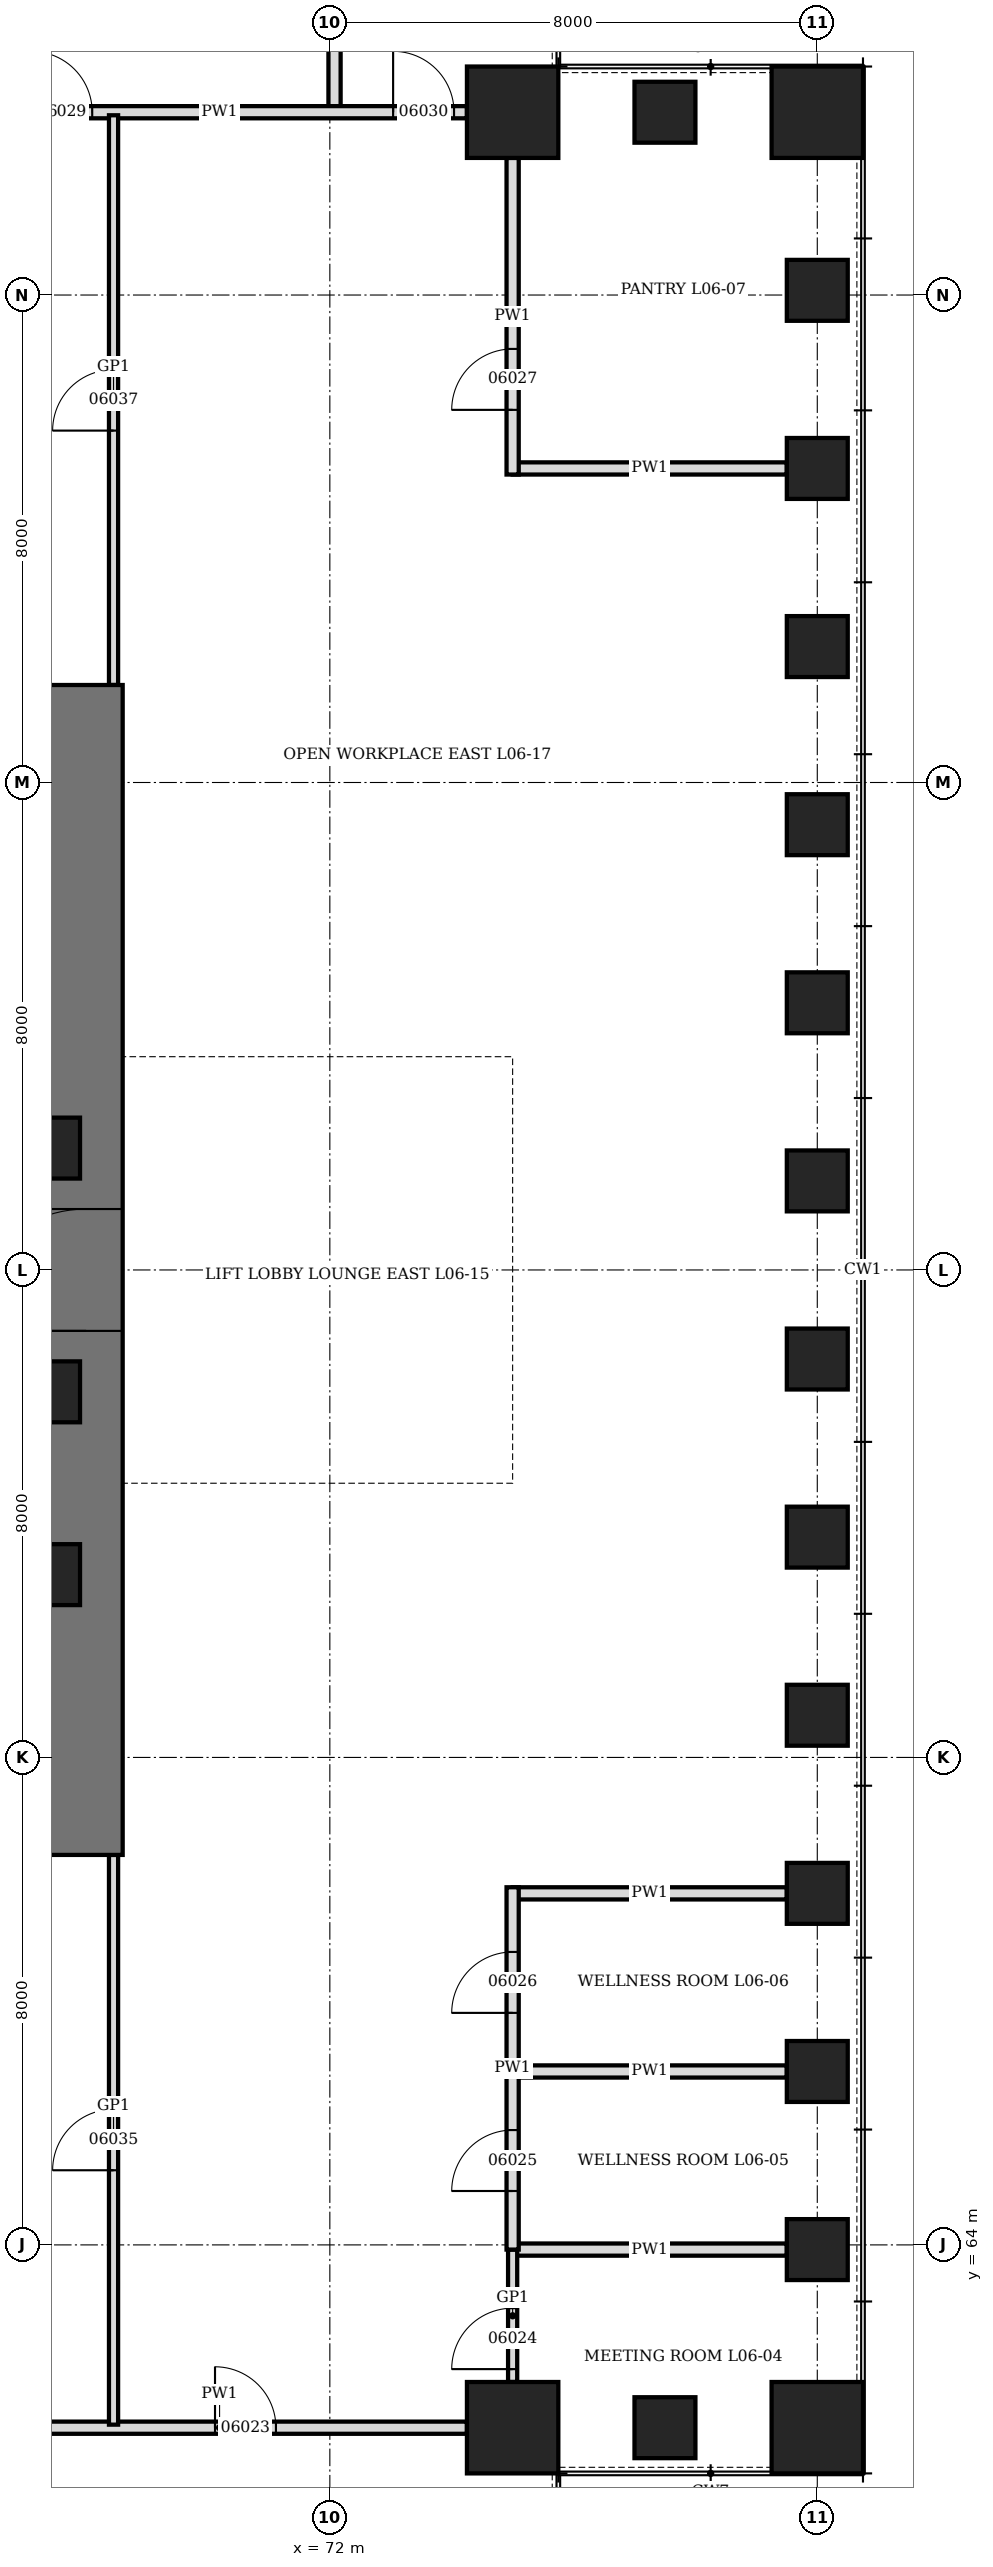
"""IFC4 building model, lengths in metres.
Left out: names, types, materials, properties, quantities, classifications, styles, units other than length and angle.
Written with IfcOpenShell. Run it as: python <this file> out.ifc"""

import sys

from ifc_helpers import new_model, si_unit, direction, frame, frame_2d, origin, origin_2d, place, context, subcontext, project, spatial, rectangle, hollow_rectangle, extrude, element, fill, save


model = new_model("IFC4")
c1 = context("Model", 3, precision=1e-05, world=origin(), true_north=direction((0.0, 1.0)))
c2 = subcontext(c1, "Body", "Model", "MODEL_VIEW")
j1 = project(units=[si_unit("LENGTHUNIT", "METRE"), si_unit("PLANEANGLEUNIT", "RADIAN")], contexts=[c1])
p1 = place(None, origin())
s1 = spatial("IfcSite", under=j1, at=p1, CompositionType="ELEMENT")
p2 = place(p1, origin())
s2 = spatial("IfcBuilding", under=s1, at=p2, CompositionType="ELEMENT")
p3 = place(p2, frame((0.0, 0.0, 34.9)))
s3 = spatial("IfcBuildingStorey", under=s2, at=p3, CompositionType="ELEMENT", Elevation=34.9)
p4 = place(p3, frame((75.0, 61.0, -0.3), z_axis=(0.0, 0.0, 1.0), x_axis=(1.0, 0.0, 0.0)))
e1 = element("IfcColumn", 1, at=p4, inside=s3, PredefinedType="COLUMN", context=c2, shape_type="SweptSolid", body=[
    extrude(hollow_rectangle(XDim=1.5, YDim=1.5, WallThickness=0.6, at=origin_2d()), origin(), (0.0, 0.0, 1.0), 4.5),
])
p5 = place(p3, frame((77.5, 61.0, -0.3), z_axis=(0.0, 0.0, 1.0), x_axis=(1.0, 0.0, 0.0)))
e2 = element("IfcColumn", 2, at=p5, inside=s3, PredefinedType="COLUMN", context=c2, shape_type="SweptSolid", body=[
    extrude(hollow_rectangle(XDim=1.0, YDim=1.0, WallThickness=0.25, at=origin_2d()), origin(), (0.0, 0.0, 1.0), 4.5),
])
p6 = place(p3, frame((80.0, 61.0, -0.3), z_axis=(0.0, 0.0, 1.0), x_axis=(0.0, 1.0, 0.0)))
e3 = element("IfcColumn", 3, at=p6, inside=s3, PredefinedType="COLUMN", context=c2, shape_type="SweptSolid", body=[
    extrude(hollow_rectangle(XDim=1.5, YDim=1.5, WallThickness=0.6, at=origin_2d()), origin(), (0.0, 0.0, 1.0), 4.5),
])
for number, where, z_axis, x_axis in (
    (4, (80.0, 63.923, -0.3), (0.0, 0.0, 1.0), (0.0, 1.0, 0.0)),
    (5, (80.0, 66.846, -0.3), (0.0, 0.0, 1.0), (0.0, 1.0, 0.0)),
    (6, (80.0, 69.769, -0.3), (0.0, 0.0, 1.0), (0.0, 1.0, 0.0)),
    (7, (80.0, 72.692, -0.3), (0.0, 0.0, 1.0), (0.0, 1.0, 0.0)),
    (8, (80.0, 75.615, -0.3), (0.0, 0.0, 1.0), (0.0, 1.0, 0.0)),
    (9, (80.0, 78.539, -0.3), (0.0, 0.0, 1.0), (0.0, 1.0, 0.0)),
    (10, (80.0, 81.461, -0.3), (0.0, 0.0, 1.0), (0.0, 1.0, 0.0)),
    (11, (80.0, 84.385, -0.3), (0.0, 0.0, 1.0), (0.0, 1.0, 0.0)),
    (12, (80.0, 87.308, -0.3), (0.0, 0.0, 1.0), (0.0, 1.0, 0.0)),
    (13, (80.0, 90.231, -0.3), (0.0, 0.0, 1.0), (0.0, 1.0, 0.0)),
    (14, (80.0, 93.154, -0.3), (0.0, 0.0, 1.0), (0.0, 1.0, 0.0)),
    (15, (80.0, 96.077, -0.3), (0.0, 0.0, 1.0), (0.0, 1.0, 0.0)),
):
    element("IfcColumn", number, at=place(p3, frame(where, z_axis=z_axis, x_axis=x_axis)), inside=s3, PredefinedType="COLUMN", context=c2, shape_type="SweptSolid", body=[
        extrude(hollow_rectangle(XDim=1.0, YDim=1.0, WallThickness=0.25, at=origin_2d()), origin(), (0.0, 0.0, 1.0), 4.5),
    ])
p7 = place(p3, frame((80.0, 99.0, -0.3), z_axis=(0.0, 0.0, 1.0), x_axis=(1.0, 0.0, 0.0)))
e16 = element("IfcColumn", 16, at=p7, inside=s3, PredefinedType="COLUMN", context=c2, shape_type="SweptSolid", body=[
    extrude(hollow_rectangle(XDim=1.5, YDim=1.5, WallThickness=0.6, at=origin_2d()), origin(), (0.0, 0.0, 1.0), 4.5),
])
p8 = place(p3, frame((77.5, 99.0, -0.3), z_axis=(0.0, 0.0, 1.0), x_axis=(1.0, 0.0, 0.0)))
e17 = element("IfcColumn", 17, at=p8, inside=s3, PredefinedType="COLUMN", context=c2, shape_type="SweptSolid", body=[
    extrude(hollow_rectangle(XDim=1.0, YDim=1.0, WallThickness=0.25, at=origin_2d()), origin(), (0.0, 0.0, 1.0), 4.5),
])
p9 = place(p3, frame((75.0, 99.0, -0.3), z_axis=(0.0, 0.0, 1.0), x_axis=(0.0, 1.0, 0.0)))
e18 = element("IfcColumn", 18, at=p9, inside=s3, PredefinedType="COLUMN", context=c2, shape_type="SweptSolid", body=[
    extrude(hollow_rectangle(XDim=1.5, YDim=1.5, WallThickness=0.6, at=origin_2d()), origin(), (0.0, 0.0, 1.0), 4.5),
])
p10 = place(p3, frame((68.0, 70.4, 0.0), z_axis=(0.0, 0.0, 1.0), x_axis=(0.0, 1.0, 0.0)))
e19 = element("IfcWall", 19, at=p10, inside=s3, PredefinedType="SHEAR", context=c2, shape_type="SweptSolid", body=[
    extrude(rectangle(XDim=19.2, YDim=1.2, at=frame_2d((9.6, 0.0))), origin(), (0.0, 0.0, 1.0), 4.2),
])
p11 = place(p10, frame((8.6, 0.0, 0.0)))
e20 = element("IfcOpeningElement", 20, at=p11, cuts=e19, PredefinedType="OPENING", context=c2, shape_type="SweptSolid", body=[
    extrude(rectangle(XDim=2.0, YDim=2.4, at=frame_2d((1.0, 1.2))), frame((0.0, 0.61, 0.0), z_axis=(0.0, -1.0, 0.0), x_axis=(1.0, 0.0, 0.0)), (0.0, 0.0, 1.0), 1.22),
])
for number, where, z_axis, x_axis in (
    (21, (67.4, 75.0, 0.0), (0.0, 0.0, 1.0), (1.0, 0.0, 0.0)),
    (22, (67.4, 78.0, 0.0), (0.0, 0.0, 1.0), (1.0, 0.0, 0.0)),
    (23, (67.4, 82.0, 0.0), (0.0, 0.0, 1.0), (1.0, 0.0, 0.0)),
):
    element("IfcColumn", number, at=place(p3, frame(where, z_axis=z_axis, x_axis=x_axis)), inside=s3, PredefinedType="COLUMN", context=c2, shape_type="SweptSolid", body=[
        extrude(hollow_rectangle(XDim=1.0, YDim=1.0, WallThickness=0.15, at=origin_2d()), origin(), (0.0, 0.0, 1.0), 4.2),
    ])
for number, where, z_axis, x_axis in (
    (24, (75.0, 63.923, 0.0), (0.0, 0.0, 1.0), (1.0, 0.0, 0.0)),
    (25, (75.0, 66.846, 0.0), (0.0, 0.0, 1.0), (1.0, 0.0, 0.0)),
    (26, (75.0, 69.769, 0.0), (0.0, 0.0, 1.0), (1.0, 0.0, 0.0)),
    (27, (75.0, 93.154, 0.0), (0.0, 0.0, 1.0), (1.0, 0.0, 0.0)),
    (28, (72.077, 99.0, 0.0), (0.0, 0.0, 1.0), (0.0, 1.0, 0.0)),
):
    element("IfcWall", number, at=place(p3, frame(where, z_axis=z_axis, x_axis=x_axis)), inside=s3, PredefinedType="PARTITIONING", context=c2, shape_type="SweptSolid", body=[
        extrude(rectangle(XDim=4.5, YDim=0.2, at=frame_2d((2.25, 0.0))), origin(), (0.0, 0.0, 1.0), 3.428),
    ])
p12 = place(p3, frame((66.131, 61.0, 0.0), z_axis=(0.0, 0.0, 1.0), x_axis=(1.0, 0.0, 0.0)))
e29 = element("IfcWall", 29, at=p12, inside=s3, PredefinedType="PARTITIONING", context=c2, shape_type="SweptSolid", body=[
    extrude(rectangle(XDim=8.119, YDim=0.2, at=frame_2d((4.06, 0.0))), origin(), (0.0, 0.0, 1.0), 4.04),
])
p13 = place(p12, frame((3.985, 0.0, 0.0)))
e30 = element("IfcOpeningElement", 30, at=p13, cuts=e29, PredefinedType="OPENING", context=c2, shape_type="SweptSolid", body=[
    extrude(rectangle(XDim=1.0, YDim=2.1, at=frame_2d((0.5, 1.05))), frame((0.0, 0.11, 0.0), z_axis=(0.0, -1.0, 0.0), x_axis=(1.0, 0.0, 0.0)), (0.0, 0.0, 1.0), 0.22),
])
p14 = place(p3, frame((66.131, 99.0, 0.0), z_axis=(0.0, 0.0, 1.0), x_axis=(1.0, 0.0, 0.0)))
e31 = element("IfcWall", 31, at=p14, inside=s3, PredefinedType="PARTITIONING", context=c2, shape_type="SweptSolid", body=[
    extrude(rectangle(XDim=8.119, YDim=0.2, at=frame_2d((4.06, 0.0))), origin(), (0.0, 0.0, 1.0), 4.04),
])
p15 = place(p14, frame((0.969, 0.0, 0.0)))
e32 = element("IfcOpeningElement", 32, at=p15, cuts=e31, PredefinedType="OPENING", context=c2, shape_type="SweptSolid", body=[
    extrude(rectangle(XDim=1.0, YDim=2.1, at=frame_2d((0.5, 1.05))), frame((0.0, 0.11, 0.0), z_axis=(0.0, -1.0, 0.0), x_axis=(1.0, 0.0, 0.0)), (0.0, 0.0, 1.0), 0.22),
])
p16 = place(p14, frame((6.908, 0.0, 0.0)))
e33 = element("IfcOpeningElement", 33, at=p16, cuts=e31, PredefinedType="OPENING", context=c2, shape_type="SweptSolid", body=[
    extrude(rectangle(XDim=1.0, YDim=2.1, at=frame_2d((0.5, 1.05))), frame((0.0, 0.11, 0.0), z_axis=(0.0, -1.0, 0.0), x_axis=(1.0, 0.0, 0.0)), (0.0, 0.0, 1.0), 0.22),
])
p17 = place(p3, frame((68.45, 61.05, 0.0), z_axis=(0.0, 0.0, 1.0), x_axis=(0.0, 1.0, 0.0)))
e34 = element("IfcWall", 34, at=p17, inside=s3, PredefinedType="PARTITIONING", context=c2, shape_type="SweptSolid", body=[
    extrude(rectangle(XDim=9.35, YDim=0.15, at=frame_2d((4.675, 0.0))), origin(), (0.0, 0.0, 1.0), 4.04),
])
p18 = place(p17, frame((4.175, 0.0, 0.0)))
e35 = element("IfcOpeningElement", 35, at=p18, cuts=e34, PredefinedType="OPENING", context=c2, shape_type="SweptSolid", body=[
    extrude(rectangle(XDim=1.0, YDim=2.4, at=frame_2d((0.5, 1.2))), frame((0.0, 0.085, 0.0), z_axis=(0.0, -1.0, 0.0), x_axis=(1.0, 0.0, 0.0)), (0.0, 0.0, 1.0), 0.17),
])
p19 = place(p3, frame((68.45, 89.6, 0.0), z_axis=(0.0, 0.0, 1.0), x_axis=(0.0, 1.0, 0.0)))
e36 = element("IfcWall", 36, at=p19, inside=s3, PredefinedType="PARTITIONING", context=c2, shape_type="SweptSolid", body=[
    extrude(rectangle(XDim=9.35, YDim=0.15, at=frame_2d((4.675, 0.0))), origin(), (0.0, 0.0, 1.0), 4.04),
])
p20 = place(p19, frame((4.175, 0.0, 0.0)))
e37 = element("IfcOpeningElement", 37, at=p20, cuts=e36, PredefinedType="OPENING", context=c2, shape_type="SweptSolid", body=[
    extrude(rectangle(XDim=1.0, YDim=2.4, at=frame_2d((0.5, 1.2))), frame((0.0, 0.085, 0.0), z_axis=(0.0, -1.0, 0.0), x_axis=(1.0, 0.0, 0.0)), (0.0, 0.0, 1.0), 0.17),
])
p21 = place(p3, frame((75.0, 61.75, 0.0), z_axis=(0.0, 0.0, 1.0), x_axis=(0.0, 1.0, 0.0)))
e38 = element("IfcWall", 38, at=p21, inside=s3, PredefinedType="PARTITIONING", context=c2, shape_type="SweptSolid", body=[
    extrude(rectangle(XDim=2.173, YDim=0.15, at=frame_2d((1.086, 0.0))), origin(), (0.0, 0.0, 1.0), 4.04),
])
p22 = place(p21, frame((0.211, 0.0, 0.0)))
e39 = element("IfcOpeningElement", 39, at=p22, cuts=e38, PredefinedType="OPENING", context=c2, shape_type="SweptSolid", body=[
    extrude(rectangle(XDim=1.0, YDim=2.4, at=frame_2d((0.5, 1.2))), frame((0.0, 0.085, 0.0), z_axis=(0.0, -1.0, 0.0), x_axis=(1.0, 0.0, 0.0)), (0.0, 0.0, 1.0), 0.17),
])
p23 = place(p3, frame((75.0, 63.923, 0.0), z_axis=(0.0, 0.0, 1.0), x_axis=(0.0, 1.0, 0.0)))
e40 = element("IfcWall", 40, at=p23, inside=s3, PredefinedType="PARTITIONING", context=c2, shape_type="SweptSolid", body=[
    extrude(rectangle(XDim=5.946, YDim=0.2, at=frame_2d((2.973, 0.0))), origin(), (0.0, 0.0, 1.0), 4.04),
])
p24 = place(p23, frame((0.961, 0.0, 0.0)))
e41 = element("IfcOpeningElement", 41, at=p24, cuts=e40, PredefinedType="OPENING", context=c2, shape_type="SweptSolid", body=[
    extrude(rectangle(XDim=1.0, YDim=2.1, at=frame_2d((0.5, 1.05))), frame((0.0, 0.11, 0.0), z_axis=(0.0, -1.0, 0.0), x_axis=(1.0, 0.0, 0.0)), (0.0, 0.0, 1.0), 0.22),
])
p25 = place(p23, frame((3.885, 0.0, 0.0)))
e42 = element("IfcOpeningElement", 42, at=p25, cuts=e40, PredefinedType="OPENING", context=c2, shape_type="SweptSolid", body=[
    extrude(rectangle(XDim=1.0, YDim=2.1, at=frame_2d((0.5, 1.05))), frame((0.0, 0.11, 0.0), z_axis=(0.0, -1.0, 0.0), x_axis=(1.0, 0.0, 0.0)), (0.0, 0.0, 1.0), 0.22),
])
p26 = place(p3, frame((75.0, 93.054, 0.0), z_axis=(0.0, 0.0, 1.0), x_axis=(0.0, 1.0, 0.0)))
e43 = element("IfcWall", 43, at=p26, inside=s3, PredefinedType="PARTITIONING", context=c2, shape_type="SweptSolid", body=[
    extrude(rectangle(XDim=5.196, YDim=0.2, at=frame_2d((2.598, 0.0))), origin(), (0.0, 0.0, 1.0), 4.04),
])
p27 = place(p26, frame((1.062, 0.0, 0.0)))
e44 = element("IfcOpeningElement", 44, at=p27, cuts=e43, PredefinedType="OPENING", context=c2, shape_type="SweptSolid", body=[
    extrude(rectangle(XDim=1.0, YDim=2.1, at=frame_2d((0.5, 1.05))), frame((0.0, 0.11, 0.0), z_axis=(0.0, -1.0, 0.0), x_axis=(1.0, 0.0, 0.0)), (0.0, 0.0, 1.0), 0.22),
])
p28 = place(p11, origin())
e45 = element("IfcDoor", 45, at=p28, inside=s3, OperationType="DOUBLE_DOOR_SINGLE_SWING", PredefinedType="DOOR", context=c2, shape_type="SweptSolid", body=[
    extrude(rectangle(XDim=2.0, YDim=2.4, at=frame_2d((1.0, 1.2))), frame((0.0, 0.35, 0.0), z_axis=(0.0, -1.0, 0.0), x_axis=(1.0, 0.0, 0.0)), (0.0, 0.0, 1.0), 0.7),
])
fill(e20, e45)
p29 = place(p13, origin())
e46 = element("IfcDoor", 46, at=p29, inside=s3, OperationType="SINGLE_SWING_LEFT", PredefinedType="DOOR", context=c2, shape_type="SweptSolid", body=[
    extrude(rectangle(XDim=1.0, YDim=2.1, at=frame_2d((0.5, 1.05))), frame((0.0, 0.1, 0.0), z_axis=(0.0, -1.0, 0.0), x_axis=(1.0, 0.0, 0.0)), (0.0, 0.0, 1.0), 0.199),
])
fill(e30, e46)
p30 = place(p22, origin())
e47 = element("IfcDoor", 47, at=p30, inside=s3, OperationType="SINGLE_SWING_RIGHT", PredefinedType="DOOR", context=c2, shape_type="SweptSolid", body=[
    extrude(rectangle(XDim=1.0, YDim=2.4, at=frame_2d((0.5, 1.2))), frame((0.0, 0.075, 0.0), z_axis=(0.0, -1.0, 0.0), x_axis=(1.0, 0.0, 0.0)), (0.0, 0.0, 1.0), 0.149),
])
fill(e39, e47)
p31 = place(p24, origin())
e48 = element("IfcDoor", 48, at=p31, inside=s3, OperationType="SINGLE_SWING_LEFT", PredefinedType="DOOR", context=c2, shape_type="SweptSolid", body=[
    extrude(rectangle(XDim=1.0, YDim=2.1, at=frame_2d((0.5, 1.05))), frame((0.0, 0.1, 0.0), z_axis=(0.0, -1.0, 0.0), x_axis=(1.0, 0.0, 0.0)), (0.0, 0.0, 1.0), 0.199),
])
fill(e41, e48)
p32 = place(p25, origin())
e49 = element("IfcDoor", 49, at=p32, inside=s3, OperationType="SINGLE_SWING_LEFT", PredefinedType="DOOR", context=c2, shape_type="SweptSolid", body=[
    extrude(rectangle(XDim=1.0, YDim=2.1, at=frame_2d((0.5, 1.05))), frame((0.0, 0.1, 0.0), z_axis=(0.0, -1.0, 0.0), x_axis=(1.0, 0.0, 0.0)), (0.0, 0.0, 1.0), 0.199),
])
fill(e42, e49)
p33 = place(p27, origin())
e50 = element("IfcDoor", 50, at=p33, inside=s3, OperationType="SINGLE_SWING_LEFT", PredefinedType="DOOR", context=c2, shape_type="SweptSolid", body=[
    extrude(rectangle(XDim=1.0, YDim=2.1, at=frame_2d((0.5, 1.05))), frame((0.0, 0.1, 0.0), z_axis=(0.0, -1.0, 0.0), x_axis=(1.0, 0.0, 0.0)), (0.0, 0.0, 1.0), 0.199),
])
fill(e44, e50)
p34 = place(p15, origin())
e51 = element("IfcDoor", 51, at=p34, inside=s3, OperationType="SINGLE_SWING_LEFT", PredefinedType="DOOR", context=c2, shape_type="SweptSolid", body=[
    extrude(rectangle(XDim=1.0, YDim=2.1, at=frame_2d((0.5, 1.05))), frame((0.0, 0.1, 0.0), z_axis=(0.0, -1.0, 0.0), x_axis=(1.0, 0.0, 0.0)), (0.0, 0.0, 1.0), 0.199),
])
fill(e32, e51)
p35 = place(p16, origin())
e52 = element("IfcDoor", 52, at=p35, inside=s3, OperationType="SINGLE_SWING_LEFT", PredefinedType="DOOR", context=c2, shape_type="SweptSolid", body=[
    extrude(rectangle(XDim=1.0, YDim=2.1, at=frame_2d((0.5, 1.05))), frame((0.0, 0.1, 0.0), z_axis=(0.0, -1.0, 0.0), x_axis=(1.0, 0.0, 0.0)), (0.0, 0.0, 1.0), 0.199),
])
fill(e33, e52)
p36 = place(p18, origin())
e53 = element("IfcDoor", 53, at=p36, inside=s3, OperationType="SINGLE_SWING_RIGHT", PredefinedType="DOOR", context=c2, shape_type="SweptSolid", body=[
    extrude(rectangle(XDim=1.0, YDim=2.4, at=frame_2d((0.5, 1.2))), frame((0.0, 0.075, 0.0), z_axis=(0.0, -1.0, 0.0), x_axis=(1.0, 0.0, 0.0)), (0.0, 0.0, 1.0), 0.149),
])
fill(e35, e53)
p37 = place(p20, origin())
e54 = element("IfcDoor", 54, at=p37, inside=s3, OperationType="SINGLE_SWING_RIGHT", PredefinedType="DOOR", context=c2, shape_type="SweptSolid", body=[
    extrude(rectangle(XDim=1.0, YDim=2.4, at=frame_2d((0.5, 1.2))), frame((0.0, 0.075, 0.0), z_axis=(0.0, -1.0, 0.0), x_axis=(1.0, 0.0, 0.0)), (0.0, 0.0, 1.0), 0.149),
])
fill(e37, e54)
save(model, sys.argv[1])
